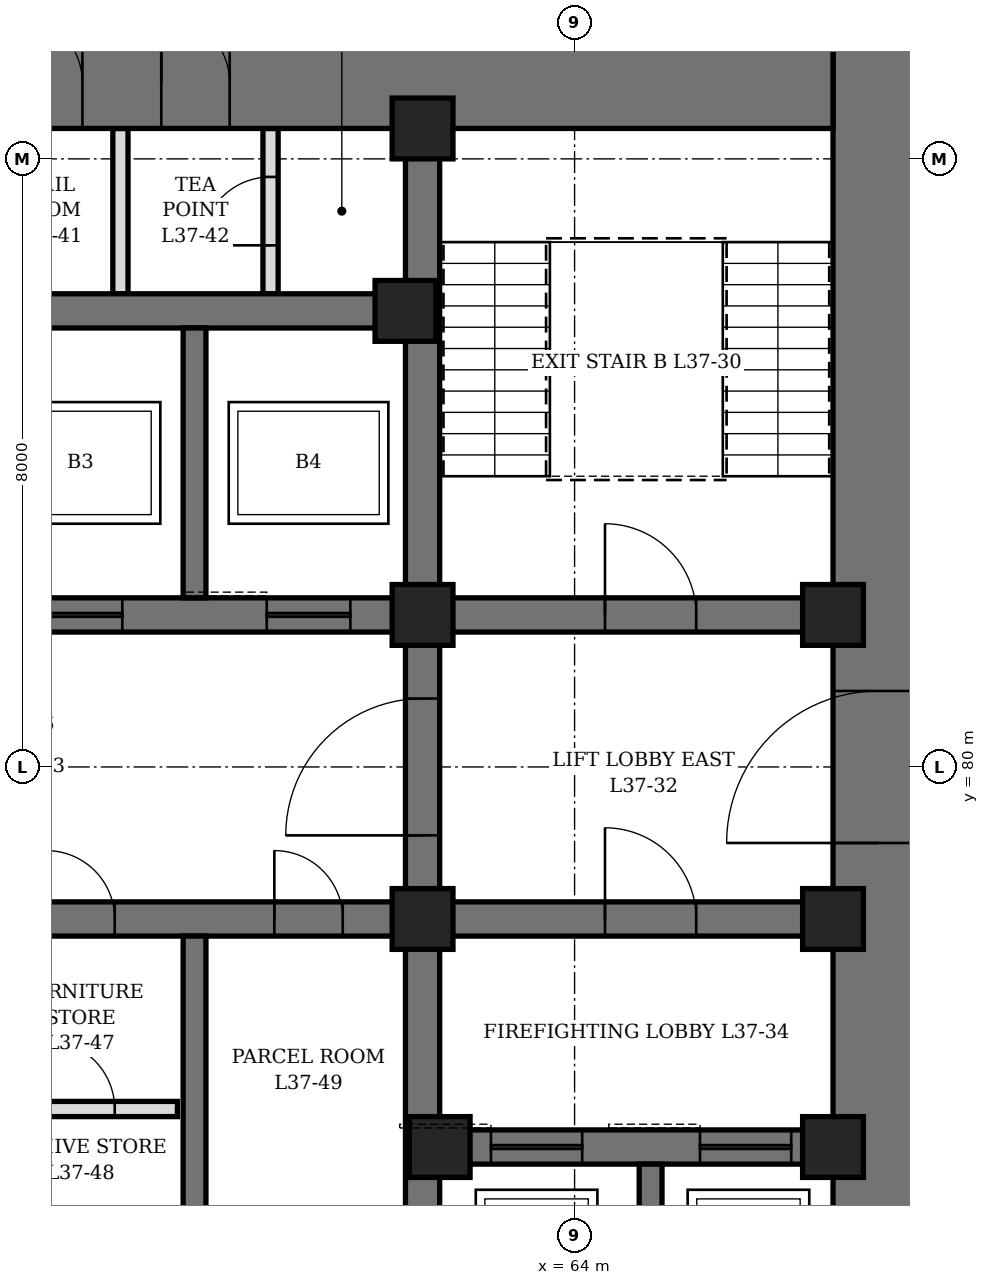
"""IFC4 building model, lengths in metres.
Left out: names, types, materials, properties, quantities, classifications, styles, units other than length and angle.
Written with IfcOpenShell. Run it as: python <this file> out.ifc"""

import sys

from ifc_helpers import new_model, si_unit, direction, frame, frame_2d, origin, origin_2d, place, context, subcontext, project, spatial, rectangle, hollow_rectangle, extrude, element, fill, save


model = new_model("IFC4")
c1 = context("Model", 3, precision=1e-05, world=origin(), true_north=direction((0.0, 1.0)))
c2 = subcontext(c1, "Body", "Model", "MODEL_VIEW")
j1 = project(units=[si_unit("LENGTHUNIT", "METRE"), si_unit("PLANEANGLEUNIT", "RADIAN")], contexts=[c1])
p1 = place(None, origin())
s1 = spatial("IfcSite", under=j1, at=p1, CompositionType="ELEMENT")
p2 = place(p1, origin())
s2 = spatial("IfcBuilding", under=s1, at=p2, CompositionType="ELEMENT")
p3 = place(p2, frame((0.0, 0.0, 166.9)))
s3 = spatial("IfcBuildingStorey", under=s2, at=p3, CompositionType="ELEMENT", Elevation=166.9)
p4 = place(p3, frame((68.0, 70.4, 0.0), z_axis=(0.0, 0.0, 1.0), x_axis=(0.0, 1.0, 0.0)))
e1 = element("IfcWall", 1, at=p4, inside=s3, PredefinedType="SHEAR", context=c2, shape_type="SweptSolid", body=[
    extrude(rectangle(XDim=19.2, YDim=1.2, at=frame_2d((9.6, 0.0))), origin(), (0.0, 0.0, 1.0), 4.2),
])
p5 = place(p4, frame((8.6, 0.0, 0.0)))
e2 = element("IfcOpeningElement", 2, at=p5, cuts=e1, PredefinedType="OPENING", context=c2, shape_type="SweptSolid", body=[
    extrude(rectangle(XDim=2.0, YDim=2.4, at=frame_2d((1.0, 1.2))), frame((0.0, 0.61, 0.0), z_axis=(0.0, -1.0, 0.0), x_axis=(1.0, 0.0, 0.0)), (0.0, 0.0, 1.0), 1.22),
])
p6 = place(p3, frame((44.6, 89.0, 0.0), z_axis=(0.0, 0.0, 1.0), x_axis=(1.0, 0.0, 0.0)))
e3 = element("IfcWall", 3, at=p6, inside=s3, PredefinedType="SHEAR", context=c2, shape_type="SweptSolid", body=[
    extrude(rectangle(XDim=22.8, YDim=1.2, at=frame_2d((11.4, 0.0))), origin(), (0.0, 0.0, 1.0), 4.2),
])
p7 = place(p6, frame((6.525, 0.0, 0.0)))
e4 = element("IfcOpeningElement", 4, at=p7, cuts=e3, PredefinedType="OPENING", context=c2, shape_type="SweptSolid", body=[
    extrude(rectangle(XDim=1.0, YDim=2.1, at=frame_2d((0.5, 1.05))), frame((0.0, 0.61, 0.0), z_axis=(0.0, -1.0, 0.0), x_axis=(1.0, 0.0, 0.0)), (0.0, 0.0, 1.0), 1.22),
])
p8 = place(p6, frame((9.45, 0.0, 0.0)))
e5 = element("IfcOpeningElement", 5, at=p8, cuts=e3, PredefinedType="OPENING", context=c2, shape_type="SweptSolid", body=[
    extrude(rectangle(XDim=0.9, YDim=2.1, at=frame_2d((0.45, 1.05))), frame((0.0, 0.61, 0.0), z_axis=(0.0, -1.0, 0.0), x_axis=(1.0, 0.0, 0.0)), (0.0, 0.0, 1.0), 1.22),
])
p9 = place(p6, frame((12.025, 0.0, 0.0)))
e6 = element("IfcOpeningElement", 6, at=p9, cuts=e3, PredefinedType="OPENING", context=c2, shape_type="SweptSolid", body=[
    extrude(rectangle(XDim=0.9, YDim=2.1, at=frame_2d((0.45, 1.05))), frame((0.0, 0.61, 0.0), z_axis=(0.0, -1.0, 0.0), x_axis=(1.0, 0.0, 0.0)), (0.0, 0.0, 1.0), 1.22),
])
p10 = place(p6, frame((13.962, 0.0, 0.0)))
e7 = element("IfcOpeningElement", 7, at=p10, cuts=e3, PredefinedType="OPENING", context=c2, shape_type="SweptSolid", body=[
    extrude(rectangle(XDim=0.9, YDim=2.1, at=frame_2d((0.45, 1.05))), frame((0.0, 0.61, 0.0), z_axis=(0.0, -1.0, 0.0), x_axis=(1.0, 0.0, 0.0)), (0.0, 0.0, 1.0), 1.22),
])
p11 = place(p3, frame((62.0, 71.6, 0.0), z_axis=(0.0, 0.0, 1.0), x_axis=(0.0, 1.0, 0.0)))
e8 = element("IfcWall", 8, at=p11, inside=s3, PredefinedType="SHEAR", context=c2, shape_type="SweptSolid", body=[
    extrude(rectangle(XDim=16.8, YDim=0.45, at=frame_2d((8.4, 0.0))), origin(), (0.0, 0.0, 1.0), 4.2),
])
p12 = place(p11, frame((7.5, 0.0, 0.0)))
e9 = element("IfcOpeningElement", 9, at=p12, cuts=e8, PredefinedType="OPENING", context=c2, shape_type="SweptSolid", body=[
    extrude(rectangle(XDim=1.8, YDim=2.4, at=frame_2d((0.9, 1.2))), frame((0.0, 0.235, 0.0), z_axis=(0.0, -1.0, 0.0), x_axis=(1.0, 0.0, 0.0)), (0.0, 0.0, 1.0), 0.47),
])
p13 = place(p3, frame((62.225, 75.0, 0.0), z_axis=(0.0, 0.0, 1.0), x_axis=(1.0, 0.0, 0.0)))
e10 = element("IfcWall", 10, at=p13, inside=s3, PredefinedType="SHEAR", context=c2, shape_type="SweptSolid", body=[
    extrude(rectangle(XDim=5.175, YDim=0.45, at=frame_2d((2.587, 0.0))), origin(), (0.0, 0.0, 1.0), 4.2),
])
p14 = place(p13, frame((0.675, 0.0, 0.0)))
e11 = element("IfcOpeningElement", 11, at=p14, cuts=e10, PredefinedType="OPENING", context=c2, shape_type="SweptSolid", body=[
    extrude(rectangle(XDim=1.2, YDim=2.2, at=frame_2d((0.6, 1.1))), frame((0.0, 0.235, 0.0), z_axis=(0.0, -1.0, 0.0), x_axis=(1.0, 0.0, 0.0)), (0.0, 0.0, 1.0), 0.47),
])
p15 = place(p13, frame((3.425, 0.0, 0.0)))
e12 = element("IfcOpeningElement", 12, at=p15, cuts=e10, PredefinedType="OPENING", context=c2, shape_type="SweptSolid", body=[
    extrude(rectangle(XDim=1.2, YDim=2.2, at=frame_2d((0.6, 1.1))), frame((0.0, 0.235, 0.0), z_axis=(0.0, -1.0, 0.0), x_axis=(1.0, 0.0, 0.0)), (0.0, 0.0, 1.0), 0.47),
])
p16 = place(p3, frame((62.225, 78.0, 0.0), z_axis=(0.0, 0.0, 1.0), x_axis=(1.0, 0.0, 0.0)))
e13 = element("IfcWall", 13, at=p16, inside=s3, PredefinedType="SHEAR", context=c2, shape_type="SweptSolid", body=[
    extrude(rectangle(XDim=5.175, YDim=0.45, at=frame_2d((2.587, 0.0))), origin(), (0.0, 0.0, 1.0), 4.2),
])
p17 = place(p16, frame((2.175, 0.0, 0.0)))
e14 = element("IfcOpeningElement", 14, at=p17, cuts=e13, PredefinedType="OPENING", context=c2, shape_type="SweptSolid", body=[
    extrude(rectangle(XDim=1.2, YDim=2.1, at=frame_2d((0.6, 1.05))), frame((0.0, 0.235, 0.0), z_axis=(0.0, -1.0, 0.0), x_axis=(1.0, 0.0, 0.0)), (0.0, 0.0, 1.0), 0.47),
])
p18 = place(p3, frame((62.225, 82.0, 0.0), z_axis=(0.0, 0.0, 1.0), x_axis=(1.0, 0.0, 0.0)))
e15 = element("IfcWall", 15, at=p18, inside=s3, PredefinedType="SHEAR", context=c2, shape_type="SweptSolid", body=[
    extrude(rectangle(XDim=5.175, YDim=0.45, at=frame_2d((2.587, 0.0))), origin(), (0.0, 0.0, 1.0), 4.2),
])
p19 = place(p18, frame((2.175, 0.0, 0.0)))
e16 = element("IfcOpeningElement", 16, at=p19, cuts=e15, PredefinedType="OPENING", context=c2, shape_type="SweptSolid", body=[
    extrude(rectangle(XDim=1.2, YDim=2.1, at=frame_2d((0.6, 1.05))), frame((0.0, 0.235, 0.0), z_axis=(0.0, -1.0, 0.0), x_axis=(1.0, 0.0, 0.0)), (0.0, 0.0, 1.0), 0.47),
])
p20 = place(p3, frame((50.225, 78.0, 0.0), z_axis=(0.0, 0.0, 1.0), x_axis=(1.0, 0.0, 0.0)))
e17 = element("IfcWall", 17, at=p20, inside=s3, PredefinedType="SHEAR", context=c2, shape_type="SweptSolid", body=[
    extrude(rectangle(XDim=11.55, YDim=0.45, at=frame_2d((5.775, 0.0))), origin(), (0.0, 0.0, 1.0), 4.2),
])
p21 = place(p20, frame((0.825, 0.0, 0.0)))
e18 = element("IfcOpeningElement", 18, at=p21, cuts=e17, PredefinedType="OPENING", context=c2, shape_type="SweptSolid", body=[
    extrude(rectangle(XDim=0.9, YDim=2.1, at=frame_2d((0.45, 1.05))), frame((0.0, 0.235, 0.0), z_axis=(0.0, -1.0, 0.0), x_axis=(1.0, 0.0, 0.0)), (0.0, 0.0, 1.0), 0.47),
])
p22 = place(p20, frame((3.825, 0.0, 0.0)))
e19 = element("IfcOpeningElement", 19, at=p22, cuts=e17, PredefinedType="OPENING", context=c2, shape_type="SweptSolid", body=[
    extrude(rectangle(XDim=0.9, YDim=2.1, at=frame_2d((0.45, 1.05))), frame((0.0, 0.235, 0.0), z_axis=(0.0, -1.0, 0.0), x_axis=(1.0, 0.0, 0.0)), (0.0, 0.0, 1.0), 0.47),
])
p23 = place(p20, frame((6.825, 0.0, 0.0)))
e20 = element("IfcOpeningElement", 20, at=p23, cuts=e17, PredefinedType="OPENING", context=c2, shape_type="SweptSolid", body=[
    extrude(rectangle(XDim=0.9, YDim=2.1, at=frame_2d((0.45, 1.05))), frame((0.0, 0.235, 0.0), z_axis=(0.0, -1.0, 0.0), x_axis=(1.0, 0.0, 0.0)), (0.0, 0.0, 1.0), 0.47),
])
p24 = place(p20, frame((9.825, 0.0, 0.0)))
e21 = element("IfcOpeningElement", 21, at=p24, cuts=e17, PredefinedType="OPENING", context=c2, shape_type="SweptSolid", body=[
    extrude(rectangle(XDim=0.9, YDim=2.1, at=frame_2d((0.45, 1.05))), frame((0.0, 0.235, 0.0), z_axis=(0.0, -1.0, 0.0), x_axis=(1.0, 0.0, 0.0)), (0.0, 0.0, 1.0), 0.47),
])
p25 = place(p3, frame((50.225, 82.0, 0.0), z_axis=(0.0, 0.0, 1.0), x_axis=(1.0, 0.0, 0.0)))
e22 = element("IfcWall", 22, at=p25, inside=s3, PredefinedType="SHEAR", context=c2, shape_type="SweptSolid", body=[
    extrude(rectangle(XDim=11.55, YDim=0.45, at=frame_2d((5.775, 0.0))), origin(), (0.0, 0.0, 1.0), 4.2),
])
p26 = place(p25, frame((0.725, 0.0, 0.0)))
e23 = element("IfcOpeningElement", 23, at=p26, cuts=e22, PredefinedType="OPENING", context=c2, shape_type="SweptSolid", body=[
    extrude(rectangle(XDim=1.1, YDim=2.2, at=frame_2d((0.55, 1.1))), frame((0.0, 0.235, 0.0), z_axis=(0.0, -1.0, 0.0), x_axis=(1.0, 0.0, 0.0)), (0.0, 0.0, 1.0), 0.47),
])
p27 = place(p25, frame((3.725, 0.0, 0.0)))
e24 = element("IfcOpeningElement", 24, at=p27, cuts=e22, PredefinedType="OPENING", context=c2, shape_type="SweptSolid", body=[
    extrude(rectangle(XDim=1.1, YDim=2.2, at=frame_2d((0.55, 1.1))), frame((0.0, 0.235, 0.0), z_axis=(0.0, -1.0, 0.0), x_axis=(1.0, 0.0, 0.0)), (0.0, 0.0, 1.0), 0.47),
])
p28 = place(p25, frame((6.725, 0.0, 0.0)))
e25 = element("IfcOpeningElement", 25, at=p28, cuts=e22, PredefinedType="OPENING", context=c2, shape_type="SweptSolid", body=[
    extrude(rectangle(XDim=1.1, YDim=2.2, at=frame_2d((0.55, 1.1))), frame((0.0, 0.235, 0.0), z_axis=(0.0, -1.0, 0.0), x_axis=(1.0, 0.0, 0.0)), (0.0, 0.0, 1.0), 0.47),
])
p29 = place(p25, frame((9.725, 0.0, 0.0)))
e26 = element("IfcOpeningElement", 26, at=p29, cuts=e22, PredefinedType="OPENING", context=c2, shape_type="SweptSolid", body=[
    extrude(rectangle(XDim=1.1, YDim=2.2, at=frame_2d((0.55, 1.1))), frame((0.0, 0.235, 0.0), z_axis=(0.0, -1.0, 0.0), x_axis=(1.0, 0.0, 0.0)), (0.0, 0.0, 1.0), 0.47),
])
p30 = place(p3, frame((50.225, 86.0, 0.0), z_axis=(0.0, 0.0, 1.0), x_axis=(1.0, 0.0, 0.0)))
e27 = element("IfcWall", 27, at=p30, inside=s3, PredefinedType="SHEAR", context=c2, shape_type="SweptSolid", body=[
    extrude(rectangle(XDim=11.55, YDim=0.45, at=frame_2d((5.775, 0.0))), origin(), (0.0, 0.0, 1.0), 4.2),
])
p31 = place(p3, frame((59.0, 74.15, 0.0), z_axis=(0.0, 0.0, 1.0), x_axis=(0.0, 1.0, 0.0)))
e28 = element("IfcWall", 28, at=p31, inside=s3, PredefinedType="SHEAR", context=c2, shape_type="SweptSolid", body=[
    extrude(rectangle(XDim=3.625, YDim=0.3, at=frame_2d((1.812, 0.0))), origin(), (0.0, 0.0, 1.0), 4.2),
])
p32 = place(p3, frame((59.0, 82.225, 0.0), z_axis=(0.0, 0.0, 1.0), x_axis=(0.0, 1.0, 0.0)))
e29 = element("IfcWall", 29, at=p32, inside=s3, PredefinedType="SHEAR", context=c2, shape_type="SweptSolid", body=[
    extrude(rectangle(XDim=3.55, YDim=0.3, at=frame_2d((1.775, 0.0))), origin(), (0.0, 0.0, 1.0), 4.2),
])
p33 = place(p3, frame((65.0, 71.6, 0.0), z_axis=(0.0, 0.0, 1.0), x_axis=(0.0, 1.0, 0.0)))
e30 = element("IfcWall", 30, at=p33, inside=s3, PredefinedType="SHEAR", context=c2, shape_type="SweptSolid", body=[
    extrude(rectangle(XDim=3.175, YDim=0.3, at=frame_2d((1.587, 0.0))), origin(), (0.0, 0.0, 1.0), 4.2),
])
for number, where, z_axis, x_axis in (
    (31, (61.775, 86.0, 0.0), (0.0, 0.0, 1.0), (1.0, 0.0, 0.0)),
    (32, (62.0, 78.0, 0.0), (0.0, 0.0, 1.0), (1.0, 0.0, 0.0)),
    (33, (62.0, 82.0, 0.0), (0.0, 0.0, 1.0), (1.0, 0.0, 0.0)),
    (34, (62.0, 88.4, 0.0), (0.0, 0.0, 1.0), (1.0, 0.0, 0.0)),
    (35, (62.225, 75.0, 0.0), (0.0, 0.0, 1.0), (1.0, 0.0, 0.0)),
    (36, (67.4, 75.0, 0.0), (0.0, 0.0, 1.0), (1.0, 0.0, 0.0)),
    (37, (67.4, 78.0, 0.0), (0.0, 0.0, 1.0), (1.0, 0.0, 0.0)),
    (38, (67.4, 82.0, 0.0), (0.0, 0.0, 1.0), (1.0, 0.0, 0.0)),
):
    element("IfcColumn", number, at=place(p3, frame(where, z_axis=z_axis, x_axis=x_axis)), inside=s3, PredefinedType="COLUMN", context=c2, shape_type="SweptSolid", body=[
        extrude(hollow_rectangle(XDim=0.8, YDim=0.8, WallThickness=0.1, at=origin_2d()), origin(), (0.0, 0.0, 1.0), 4.2),
    ])
p34 = place(p3, frame((60.0, 86.225, 0.0), z_axis=(0.0, 0.0, 1.0), x_axis=(0.0, 1.0, 0.0)))
e39 = element("IfcWall", 39, at=p34, inside=s3, PredefinedType="PARTITIONING", context=c2, shape_type="SweptSolid", body=[
    extrude(rectangle(XDim=2.175, YDim=0.2, at=frame_2d((1.087, 0.0))), origin(), (0.0, 0.0, 1.0), 4.04),
])
p35 = place(p34, frame((0.637, 0.0, 0.0)))
e40 = element("IfcOpeningElement", 40, at=p35, cuts=e39, PredefinedType="OPENING", context=c2, shape_type="SweptSolid", body=[
    extrude(rectangle(XDim=0.9, YDim=2.1, at=frame_2d((0.45, 1.05))), frame((0.0, 0.11, 0.0), z_axis=(0.0, -1.0, 0.0), x_axis=(1.0, 0.0, 0.0)), (0.0, 0.0, 1.0), 0.22),
])
p36 = place(p3, frame((58.025, 86.225, 0.0), z_axis=(0.0, 0.0, 1.0), x_axis=(0.0, 1.0, 0.0)))
e41 = element("IfcWall", 41, at=p36, inside=s3, PredefinedType="PARTITIONING", context=c2, shape_type="SweptSolid", body=[
    extrude(rectangle(XDim=2.175, YDim=0.2, at=frame_2d((1.087, 0.0))), origin(), (0.0, 0.0, 1.0), 4.04),
])
p37 = place(p3, frame((56.225, 75.5, 0.0), z_axis=(0.0, 0.0, 1.0), x_axis=(1.0, 0.0, 0.0)))
e42 = element("IfcWall", 42, at=p37, inside=s3, PredefinedType="PARTITIONING", context=c2, shape_type="SweptSolid", body=[
    extrude(rectangle(XDim=2.55, YDim=0.2, at=frame_2d((1.275, 0.0))), origin(), (0.0, 0.0, 1.0), 4.04),
])
p38 = place(p37, frame((0.825, 0.0, 0.0)))
e43 = element("IfcOpeningElement", 43, at=p38, cuts=e42, PredefinedType="OPENING", context=c2, shape_type="SweptSolid", body=[
    extrude(rectangle(XDim=0.9, YDim=2.1, at=frame_2d((0.45, 1.05))), frame((0.0, 0.11, 0.0), z_axis=(0.0, -1.0, 0.0), x_axis=(1.0, 0.0, 0.0)), (0.0, 0.0, 1.0), 0.22),
])
p39 = place(p9, origin())
e44 = element("IfcDoor", 44, at=p39, inside=s3, OperationType="SINGLE_SWING_LEFT", PredefinedType="DOOR", context=c2, shape_type="SweptSolid", body=[
    extrude(rectangle(XDim=0.9, YDim=2.1, at=frame_2d((0.45, 1.05))), frame((0.0, 0.35, 0.0), z_axis=(0.0, -1.0, 0.0), x_axis=(1.0, 0.0, 0.0)), (0.0, 0.0, 1.0), 0.7),
])
fill(e6, e44)
p40 = place(p10, origin())
e45 = element("IfcDoor", 45, at=p40, inside=s3, OperationType="SINGLE_SWING_LEFT", PredefinedType="DOOR", context=c2, shape_type="SweptSolid", body=[
    extrude(rectangle(XDim=0.9, YDim=2.1, at=frame_2d((0.45, 1.05))), frame((0.0, 0.35, 0.0), z_axis=(0.0, -1.0, 0.0), x_axis=(1.0, 0.0, 0.0)), (0.0, 0.0, 1.0), 0.7),
])
fill(e7, e45)
p41 = place(p35, origin())
e46 = element("IfcDoor", 46, at=p41, inside=s3, OperationType="SINGLE_SWING_LEFT", PredefinedType="DOOR", context=c2, shape_type="SweptSolid", body=[
    extrude(rectangle(XDim=0.9, YDim=2.1, at=frame_2d((0.45, 1.05))), frame((0.0, 0.1, 0.0), z_axis=(0.0, -1.0, 0.0), x_axis=(1.0, 0.0, 0.0)), (0.0, 0.0, 1.0), 0.199),
])
fill(e40, e46)
p42 = place(p23, origin())
e47 = element("IfcDoor", 47, at=p42, inside=s3, OperationType="SINGLE_SWING_LEFT", PredefinedType="DOOR", context=c2, shape_type="SweptSolid", body=[
    extrude(rectangle(XDim=0.9, YDim=2.1, at=frame_2d((0.45, 1.05))), frame((0.0, 0.225, 0.0), z_axis=(0.0, -1.0, 0.0), x_axis=(1.0, 0.0, 0.0)), (0.0, 0.0, 1.0), 0.449),
])
fill(e20, e47)
p43 = place(p38, origin())
e48 = element("IfcDoor", 48, at=p43, inside=s3, OperationType="SINGLE_SWING_LEFT", PredefinedType="DOOR", context=c2, shape_type="SweptSolid", body=[
    extrude(rectangle(XDim=0.9, YDim=2.1, at=frame_2d((0.45, 1.05))), frame((0.0, 0.1, 0.0), z_axis=(0.0, -1.0, 0.0), x_axis=(1.0, 0.0, 0.0)), (0.0, 0.0, 1.0), 0.199),
])
fill(e43, e48)
p44 = place(p24, origin())
e49 = element("IfcDoor", 49, at=p44, inside=s3, OperationType="SINGLE_SWING_LEFT", PredefinedType="DOOR", context=c2, shape_type="SweptSolid", body=[
    extrude(rectangle(XDim=0.9, YDim=2.1, at=frame_2d((0.45, 1.05))), frame((0.0, 0.225, 0.0), z_axis=(0.0, -1.0, 0.0), x_axis=(1.0, 0.0, 0.0)), (0.0, 0.0, 1.0), 0.449),
])
fill(e21, e49)
p45 = place(p19, origin())
e50 = element("IfcDoor", 50, at=p45, inside=s3, OperationType="SINGLE_SWING_LEFT", PredefinedType="DOOR", context=c2, shape_type="SweptSolid", body=[
    extrude(rectangle(XDim=1.2, YDim=2.1, at=frame_2d((0.6, 1.05))), frame((0.0, 0.225, 0.0), z_axis=(0.0, -1.0, 0.0), x_axis=(1.0, 0.0, 0.0)), (0.0, 0.0, 1.0), 0.449),
])
fill(e16, e50)
p46 = place(p5, origin())
e51 = element("IfcDoor", 51, at=p46, inside=s3, OperationType="DOUBLE_DOOR_SINGLE_SWING", PredefinedType="DOOR", context=c2, shape_type="SweptSolid", body=[
    extrude(rectangle(XDim=2.0, YDim=2.4, at=frame_2d((1.0, 1.2))), frame((0.0, 0.35, 0.0), z_axis=(0.0, -1.0, 0.0), x_axis=(1.0, 0.0, 0.0)), (0.0, 0.0, 1.0), 0.7),
])
fill(e2, e51)
p47 = place(p12, origin())
e52 = element("IfcDoor", 52, at=p47, inside=s3, OperationType="DOUBLE_DOOR_SINGLE_SWING", PredefinedType="DOOR", context=c2, shape_type="SweptSolid", body=[
    extrude(rectangle(XDim=1.8, YDim=2.4, at=frame_2d((0.9, 1.2))), frame((0.0, 0.225, 0.0), z_axis=(0.0, -1.0, 0.0), x_axis=(1.0, 0.0, 0.0)), (0.0, 0.0, 1.0), 0.449),
])
fill(e9, e52)
p48 = place(p17, origin())
e53 = element("IfcDoor", 53, at=p48, inside=s3, OperationType="SINGLE_SWING_RIGHT", PredefinedType="DOOR", context=c2, shape_type="SweptSolid", body=[
    extrude(rectangle(XDim=1.2, YDim=2.1, at=frame_2d((0.6, 1.05))), frame((0.0, 0.225, 0.0), z_axis=(0.0, -1.0, 0.0), x_axis=(1.0, 0.0, 0.0)), (0.0, 0.0, 1.0), 0.449),
])
fill(e14, e53)
p49 = place(p28, origin())
e54 = element("IfcDoor", 54, at=p49, inside=s3, OperationType="SLIDING_TO_LEFT", PredefinedType="DOOR", context=c2, shape_type="SweptSolid", body=[
    extrude(rectangle(XDim=1.1, YDim=2.2, at=frame_2d((0.55, 1.1))), frame((0.0, 0.225, 0.0), z_axis=(0.0, -1.0, 0.0), x_axis=(1.0, 0.0, 0.0)), (0.0, 0.0, 1.0), 0.449),
])
fill(e25, e54)
p50 = place(p29, origin())
e55 = element("IfcDoor", 55, at=p50, inside=s3, OperationType="SLIDING_TO_LEFT", PredefinedType="DOOR", context=c2, shape_type="SweptSolid", body=[
    extrude(rectangle(XDim=1.1, YDim=2.2, at=frame_2d((0.55, 1.1))), frame((0.0, 0.225, 0.0), z_axis=(0.0, -1.0, 0.0), x_axis=(1.0, 0.0, 0.0)), (0.0, 0.0, 1.0), 0.449),
])
fill(e26, e55)
p51 = place(p14, origin())
e56 = element("IfcDoor", 56, at=p51, inside=s3, OperationType="SLIDING_TO_LEFT", PredefinedType="DOOR", context=c2, shape_type="SweptSolid", body=[
    extrude(rectangle(XDim=1.2, YDim=2.2, at=frame_2d((0.6, 1.1))), frame((0.0, 0.225, 0.0), z_axis=(0.0, -1.0, 0.0), x_axis=(1.0, 0.0, 0.0)), (0.0, 0.0, 1.0), 0.449),
])
fill(e11, e56)
p52 = place(p15, origin())
e57 = element("IfcDoor", 57, at=p52, inside=s3, OperationType="SLIDING_TO_LEFT", PredefinedType="DOOR", context=c2, shape_type="SweptSolid", body=[
    extrude(rectangle(XDim=1.2, YDim=2.2, at=frame_2d((0.6, 1.1))), frame((0.0, 0.225, 0.0), z_axis=(0.0, -1.0, 0.0), x_axis=(1.0, 0.0, 0.0)), (0.0, 0.0, 1.0), 0.449),
])
fill(e12, e57)
save(model, sys.argv[1])
